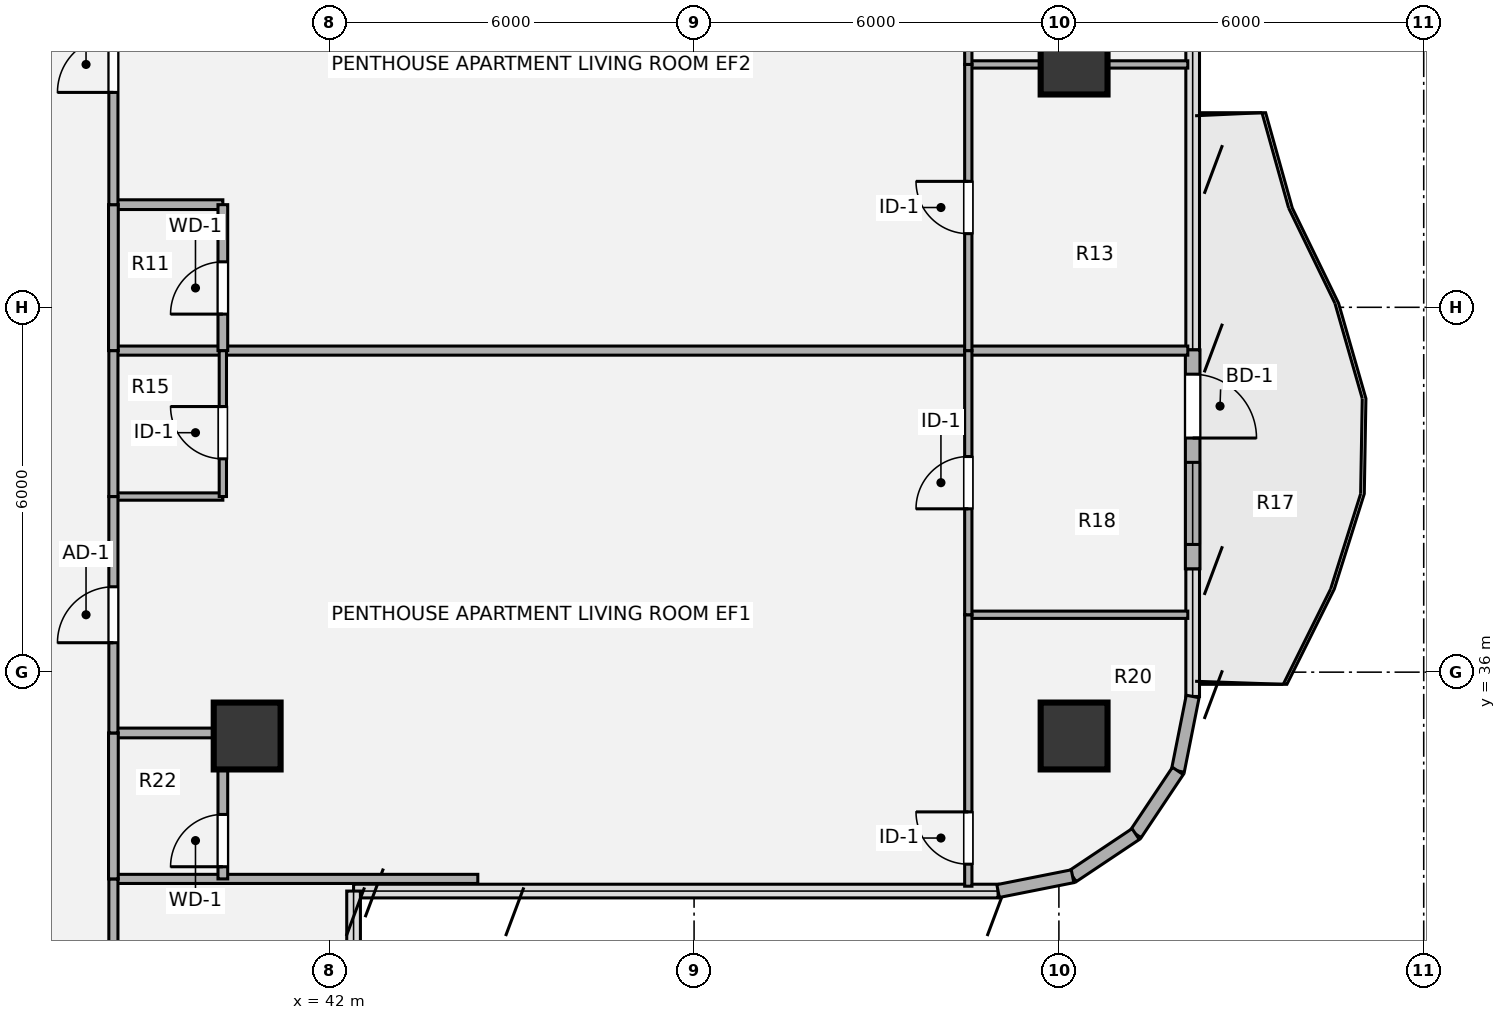
"""IFC4 building model, lengths in metres.
Left out: names, types, materials, properties, quantities, classifications, styles, units other than length and angle.
Written with IfcOpenShell. Run it as: python <this file> out.ifc"""

import sys

from ifc_helpers import new_model, si_unit, direction, frame, frame_2d, origin, origin_2d, place, context, subcontext, project, spatial, rectangle, hollow_circle, extrude, source, transform, mapped, element, fill, save


model = new_model("IFC4")
c1 = context("Model", 3, precision=1e-05, world=origin(), true_north=direction((0.0, 1.0)))
c2 = subcontext(c1, "Body", "Model", "MODEL_VIEW")
j1 = project(units=[si_unit("LENGTHUNIT", "METRE"), si_unit("PLANEANGLEUNIT", "RADIAN")], contexts=[c1])
p1 = place(None, origin())
s1 = spatial("IfcSite", under=j1, at=p1, CompositionType="ELEMENT")
p2 = place(p1, origin())
s2 = spatial("IfcBuilding", under=s1, at=p2, CompositionType="ELEMENT")
p3 = place(p2, frame((0.0, 0.0, 163.98)))
s3 = spatial("IfcBuildingStorey", under=s2, at=p3, CompositionType="ELEMENT", Elevation=163.98)
m1 = source(origin(), c2, "Body", "SweptSolid", [
    extrude(hollow_circle(Radius=0.55, WallThickness=0.04, at=origin_2d()), origin(), (0.0, 0.0, 1.0), 3.78),
])
for number, where, z_axis, x_axis in (
    (1, (54.25, 34.95, 0.0), (0.0, 0.0, 1.0), (1.0, 0.0, 0.0)),
    (2, (54.25, 46.05, 0.0), (0.0, 0.0, 1.0), (1.0, 0.0, 0.0)),
    (3, (40.65, 34.95, 0.0), (0.0, 0.0, 1.0), (1.0, 0.0, 0.0)),
):
    element("IfcColumn", number, at=place(p3, frame(where, z_axis=z_axis, x_axis=x_axis)), inside=s3, PredefinedType="COLUMN", context=c2, shape_type="MappedRepresentation", body=[
        mapped(m1, transform((0.0, 0.0, 0.0), x_axis=(1.0, 0.0, 0.0), y_axis=(0.0, 1.0, 0.0), z_axis=(0.0, 0.0, 1.0), scale=1.0)),
    ])
p4 = place(p3, frame((56.2, 41.3, 0.0), z_axis=(0.0, 0.0, 1.0), x_axis=(0.0, -1.0, 0.0)))
e4 = element("IfcWall", 4, at=p4, inside=s3, PredefinedType="SOLIDWALL", context=c2, shape_type="SweptSolid", body=[
    extrude(rectangle(XDim=3.6, YDim=0.24, at=frame_2d((1.8, 0.0))), origin(), (0.0, 0.0, 1.0), 3.53),
])
p5 = place(p4, frame((0.4, 0.0, 0.0)))
e5 = element("IfcOpeningElement", 5, at=p5, cuts=e4, PredefinedType="OPENING", context=c2, shape_type="SweptSolid", body=[
    extrude(rectangle(XDim=1.05, YDim=2.15, at=origin_2d()), frame((0.525, 0.13, 1.075), z_axis=(0.0, -1.0, 0.0), x_axis=(1.0, 0.0, 0.0)), (0.0, 0.0, 1.0), 0.26),
])
p6 = place(p4, frame((1.85, 0.0, 0.85)))
e6 = element("IfcOpeningElement", 6, at=p6, cuts=e4, PredefinedType="OPENING", context=c2, shape_type="SweptSolid", body=[
    extrude(rectangle(XDim=1.35, YDim=1.35, at=origin_2d()), frame((0.675, 0.13, 0.675), z_axis=(0.0, -1.0, 0.0), x_axis=(1.0, 0.0, 0.0)), (0.0, 0.0, 1.0), 0.26),
])
for number, where, z_axis, x_axis in (
    (7, (56.2, 35.6, 0.0), (0.0, 0.0, 1.0), (-0.195, -0.981, 0.0)),
    (8, (55.956, 34.375, 0.0), (0.0, 0.0, 1.0), (-0.556, -0.831, 0.0)),
    (9, (55.263, 33.337, 0.0), (0.0, 0.0, 1.0), (-0.831, -0.556, 0.0)),
    (10, (54.225, 32.644, 0.0), (0.0, 0.0, 1.0), (-0.981, -0.195, 0.0)),
):
    element("IfcWall", number, at=place(p3, frame(where, z_axis=z_axis, x_axis=x_axis)), inside=s3, PredefinedType="SOLIDWALL", context=c2, shape_type="SweptSolid", body=[
        extrude(rectangle(XDim=1.249, YDim=0.215, at=frame_2d((0.624, 0.0))), origin(), (0.0, 0.0, 1.0), 3.53),
    ])
p7 = place(p3, frame((38.45, 32.6, 0.0), z_axis=(0.0, 0.0, 1.0), x_axis=(1.0, 0.0, 0.0)))
e11 = element("IfcWall", 11, at=p7, inside=s3, PredefinedType="PARTITIONING", context=c2, shape_type="SweptSolid", body=[
    extrude(rectangle(XDim=5.993, YDim=0.15, at=frame_2d((2.997, 0.0))), origin(), (0.0, 0.0, 1.0), 3.5),
])
p8 = place(p3, frame((38.45, 35.0, 0.0), z_axis=(0.0, 0.0, 1.0), x_axis=(1.0, 0.0, 0.0)))
e12 = element("IfcWall", 12, at=p8, inside=s3, PredefinedType="PLUMBINGWALL", context=c2, shape_type="SweptSolid", body=[
    extrude(rectangle(XDim=1.8, YDim=0.16, at=frame_2d((0.9, 0.0))), origin(), (0.0, 0.0, 1.0), 2.903),
])
p9 = place(p3, frame((52.51, 36.944, 0.0), z_axis=(0.0, 0.0, 1.0), x_axis=(1.0, 0.0, 0.0)))
e13 = element("IfcWall", 13, at=p9, inside=s3, PredefinedType="PARTITIONING", context=c2, shape_type="SweptSolid", body=[
    extrude(rectangle(XDim=3.61, YDim=0.12, at=frame_2d((1.805, 0.0))), origin(), (0.0, 0.0, 1.0), 2.982),
])
p10 = place(p3, frame((38.45, 38.888, 0.0), z_axis=(0.0, 0.0, 1.0), x_axis=(1.0, 0.0, 0.0)))
e14 = element("IfcWall", 14, at=p10, inside=s3, PredefinedType="PARTITIONING", context=c2, shape_type="SweptSolid", body=[
    extrude(rectangle(XDim=1.8, YDim=0.12, at=frame_2d((0.9, 0.0))), origin(), (0.0, 0.0, 1.0), 3.259),
])
p11 = place(p3, frame((38.45, 41.288, 0.0), z_axis=(0.0, 0.0, 1.0), x_axis=(1.0, 0.0, 0.0)))
e15 = element("IfcWall", 15, at=p11, inside=s3, PredefinedType="PARTITIONING", context=c2, shape_type="SweptSolid", body=[
    extrude(rectangle(XDim=17.67, YDim=0.15, at=frame_2d((8.835, 0.0))), origin(), (0.0, 0.0, 1.0), 2.982),
])
p12 = place(p3, frame((38.45, 43.688, 0.0), z_axis=(0.0, 0.0, 1.0), x_axis=(1.0, 0.0, 0.0)))
e16 = element("IfcWall", 16, at=p12, inside=s3, PredefinedType="PLUMBINGWALL", context=c2, shape_type="SweptSolid", body=[
    extrude(rectangle(XDim=1.8, YDim=0.16, at=frame_2d((0.9, 0.0))), origin(), (0.0, 0.0, 1.0), 3.259),
])
p13 = place(p3, frame((52.51, 45.994, 0.0), z_axis=(0.0, 0.0, 1.0), x_axis=(1.0, 0.0, 0.0)))
e17 = element("IfcWall", 17, at=p13, inside=s3, PredefinedType="PARTITIONING", context=c2, shape_type="SweptSolid", body=[
    extrude(rectangle(XDim=3.61, YDim=0.12, at=frame_2d((1.805, 0.0))), origin(), (0.0, 0.0, 1.0), 2.903),
])
p14 = place(p3, frame((38.45, 22.4, 0.0), z_axis=(0.0, 0.0, 1.0), x_axis=(0.0, 1.0, 0.0)))
e18 = element("IfcWall", 18, at=p14, inside=s3, PredefinedType="PARTITIONING", context=c2, shape_type="SweptSolid", body=[
    extrude(rectangle(XDim=10.2, YDim=0.15, at=frame_2d((5.1, 0.0))), origin(), (0.0, 0.0, 1.0), 3.5),
])
p15 = place(p14, frame((4.475, 0.0, 0.0)))
e19 = element("IfcOpeningElement", 19, at=p15, cuts=e18, PredefinedType="OPENING", context=c2, shape_type="SweptSolid", body=[
    extrude(rectangle(XDim=1.05, YDim=2.1, at=origin_2d()), frame((0.525, 0.085, 1.05), z_axis=(0.0, -1.0, 0.0), x_axis=(1.0, 0.0, 0.0)), (0.0, 0.0, 1.0), 0.17),
])
p16 = place(p3, frame((38.45, 32.6, 0.0), z_axis=(0.0, 0.0, 1.0), x_axis=(0.0, 1.0, 0.0)))
e20 = element("IfcWall", 20, at=p16, inside=s3, PredefinedType="PLUMBINGWALL", context=c2, shape_type="SweptSolid", body=[
    extrude(rectangle(XDim=2.4, YDim=0.16, at=frame_2d((1.2, 0.0))), origin(), (0.0, 0.0, 1.0), 3.5),
])
p17 = place(p3, frame((38.45, 35.0, 0.0), z_axis=(0.0, 0.0, 1.0), x_axis=(0.0, 1.0, 0.0)))
e21 = element("IfcWall", 21, at=p17, inside=s3, PredefinedType="PARTITIONING", context=c2, shape_type="SweptSolid", body=[
    extrude(rectangle(XDim=3.888, YDim=0.15, at=frame_2d((1.944, 0.0))), origin(), (0.0, 0.0, 1.0), 3.5),
])
p18 = place(p17, frame((1.484, 0.0, 0.0)))
e22 = element("IfcOpeningElement", 22, at=p18, cuts=e21, PredefinedType="OPENING", context=c2, shape_type="SweptSolid", body=[
    extrude(rectangle(XDim=0.92, YDim=2.1, at=origin_2d()), frame((0.46, 0.085, 1.05), z_axis=(0.0, -1.0, 0.0), x_axis=(1.0, 0.0, 0.0)), (0.0, 0.0, 1.0), 0.17),
])
p19 = place(p3, frame((38.45, 38.888, 0.0), z_axis=(0.0, 0.0, 1.0), x_axis=(0.0, 1.0, 0.0)))
e23 = element("IfcWall", 23, at=p19, inside=s3, PredefinedType="PARTITIONING", context=c2, shape_type="SweptSolid", body=[
    extrude(rectangle(XDim=2.4, YDim=0.15, at=frame_2d((1.2, 0.0))), origin(), (0.0, 0.0, 1.0), 3.5),
])
p20 = place(p3, frame((38.45, 41.288, 0.0), z_axis=(0.0, 0.0, 1.0), x_axis=(0.0, 1.0, 0.0)))
e24 = element("IfcWall", 24, at=p20, inside=s3, PredefinedType="PLUMBINGWALL", context=c2, shape_type="SweptSolid", body=[
    extrude(rectangle(XDim=2.4, YDim=0.16, at=frame_2d((1.2, 0.0))), origin(), (0.0, 0.0, 1.0), 3.5),
])
p21 = place(p3, frame((38.45, 43.688, 0.0), z_axis=(0.0, 0.0, 1.0), x_axis=(0.0, 1.0, 0.0)))
e25 = element("IfcWall", 25, at=p21, inside=s3, PredefinedType="PARTITIONING", context=c2, shape_type="SweptSolid", body=[
    extrude(rectangle(XDim=4.612, YDim=0.15, at=frame_2d((2.306, 0.0))), origin(), (0.0, 0.0, 1.0), 3.5),
])
p22 = place(p21, frame((1.846, 0.0, 0.0)))
e26 = element("IfcOpeningElement", 26, at=p22, cuts=e25, PredefinedType="OPENING", context=c2, shape_type="SweptSolid", body=[
    extrude(rectangle(XDim=0.92, YDim=2.1, at=origin_2d()), frame((0.46, 0.085, 1.05), z_axis=(0.0, -1.0, 0.0), x_axis=(1.0, 0.0, 0.0)), (0.0, 0.0, 1.0), 0.17),
])
p23 = place(p3, frame((40.25, 32.6, 0.0), z_axis=(0.0, 0.0, 1.0), x_axis=(0.0, 1.0, 0.0)))
e27 = element("IfcWall", 27, at=p23, inside=s3, PredefinedType="PLUMBINGWALL", context=c2, shape_type="SweptSolid", body=[
    extrude(rectangle(XDim=2.4, YDim=0.16, at=frame_2d((1.2, 0.0))), origin(), (0.0, 0.0, 1.0), 3.5),
])
p24 = place(p23, frame((0.2, 0.0, 0.0)))
e28 = element("IfcOpeningElement", 28, at=p24, cuts=e27, PredefinedType="OPENING", context=c2, shape_type="SweptSolid", body=[
    extrude(rectangle(XDim=0.86, YDim=2.1, at=origin_2d()), frame((0.43, 0.09, 1.05), z_axis=(0.0, -1.0, 0.0), x_axis=(1.0, 0.0, 0.0)), (0.0, 0.0, 1.0), 0.18),
])
p25 = place(p3, frame((40.25, 38.888, 0.0), z_axis=(0.0, 0.0, 1.0), x_axis=(0.0, 1.0, 0.0)))
e29 = element("IfcWall", 29, at=p25, inside=s3, PredefinedType="PARTITIONING", context=c2, shape_type="SweptSolid", body=[
    extrude(rectangle(XDim=2.4, YDim=0.12, at=frame_2d((1.2, 0.0))), origin(), (0.0, 0.0, 1.0), 3.5),
])
p26 = place(p25, frame((0.62, 0.0, 0.0)))
e30 = element("IfcOpeningElement", 30, at=p26, cuts=e29, PredefinedType="OPENING", context=c2, shape_type="SweptSolid", body=[
    extrude(rectangle(XDim=0.86, YDim=2.1, at=origin_2d()), frame((0.43, 0.07, 1.05), z_axis=(0.0, -1.0, 0.0), x_axis=(1.0, 0.0, 0.0)), (0.0, 0.0, 1.0), 0.14),
])
p27 = place(p3, frame((40.25, 41.288, 0.0), z_axis=(0.0, 0.0, 1.0), x_axis=(0.0, 1.0, 0.0)))
e31 = element("IfcWall", 31, at=p27, inside=s3, PredefinedType="PLUMBINGWALL", context=c2, shape_type="SweptSolid", body=[
    extrude(rectangle(XDim=2.4, YDim=0.16, at=frame_2d((1.2, 0.0))), origin(), (0.0, 0.0, 1.0), 3.5),
])
p28 = place(p27, frame((0.6, 0.0, 0.0)))
e32 = element("IfcOpeningElement", 32, at=p28, cuts=e31, PredefinedType="OPENING", context=c2, shape_type="SweptSolid", body=[
    extrude(rectangle(XDim=0.86, YDim=2.1, at=origin_2d()), frame((0.43, 0.09, 1.05), z_axis=(0.0, -1.0, 0.0), x_axis=(1.0, 0.0, 0.0)), (0.0, 0.0, 1.0), 0.18),
])
p29 = place(p3, frame((52.51, 32.48, 0.0), z_axis=(0.0, 0.0, 1.0), x_axis=(0.0, 1.0, 0.0)))
e33 = element("IfcWall", 33, at=p29, inside=s3, PredefinedType="PARTITIONING", context=c2, shape_type="SweptSolid", body=[
    extrude(rectangle(XDim=4.464, YDim=0.12, at=frame_2d((2.232, 0.0))), origin(), (0.0, 0.0, 1.0), 3.5),
])
p30 = place(p29, frame((0.362, 0.0, 0.0)))
e34 = element("IfcOpeningElement", 34, at=p30, cuts=e33, PredefinedType="OPENING", context=c2, shape_type="SweptSolid", body=[
    extrude(rectangle(XDim=0.86, YDim=2.1, at=origin_2d()), frame((0.43, 0.07, 1.05), z_axis=(0.0, -1.0, 0.0), x_axis=(1.0, 0.0, 0.0)), (0.0, 0.0, 1.0), 0.14),
])
p31 = place(p3, frame((52.51, 36.944, 0.0), z_axis=(0.0, 0.0, 1.0), x_axis=(0.0, 1.0, 0.0)))
e35 = element("IfcWall", 35, at=p31, inside=s3, PredefinedType="PARTITIONING", context=c2, shape_type="SweptSolid", body=[
    extrude(rectangle(XDim=4.344, YDim=0.12, at=frame_2d((2.172, 0.0))), origin(), (0.0, 0.0, 1.0), 3.5),
])
p32 = place(p31, frame((1.742, 0.0, 0.0)))
e36 = element("IfcOpeningElement", 36, at=p32, cuts=e35, PredefinedType="OPENING", context=c2, shape_type="SweptSolid", body=[
    extrude(rectangle(XDim=0.86, YDim=2.1, at=origin_2d()), frame((0.43, 0.07, 1.05), z_axis=(0.0, -1.0, 0.0), x_axis=(1.0, 0.0, 0.0)), (0.0, 0.0, 1.0), 0.14),
])
p33 = place(p3, frame((52.51, 41.288, 0.0), z_axis=(0.0, 0.0, 1.0), x_axis=(0.0, 1.0, 0.0)))
e37 = element("IfcWall", 37, at=p33, inside=s3, PredefinedType="PARTITIONING", context=c2, shape_type="SweptSolid", body=[
    extrude(rectangle(XDim=4.706, YDim=0.12, at=frame_2d((2.353, 0.0))), origin(), (0.0, 0.0, 1.0), 3.5),
])
p34 = place(p33, frame((1.923, 0.0, 0.0)))
e38 = element("IfcOpeningElement", 38, at=p34, cuts=e37, PredefinedType="OPENING", context=c2, shape_type="SweptSolid", body=[
    extrude(rectangle(XDim=0.86, YDim=2.1, at=origin_2d()), frame((0.43, 0.07, 1.05), z_axis=(0.0, -1.0, 0.0), x_axis=(1.0, 0.0, 0.0)), (0.0, 0.0, 1.0), 0.14),
])
p35 = place(p3, frame((52.51, 45.994, 0.0), z_axis=(0.0, 0.0, 1.0), x_axis=(0.0, 1.0, 0.0)))
e39 = element("IfcWall", 39, at=p35, inside=s3, PredefinedType="PARTITIONING", context=c2, shape_type="SweptSolid", body=[
    extrude(rectangle(XDim=4.706, YDim=0.12, at=frame_2d((2.353, 0.0))), origin(), (0.0, 0.0, 1.0), 3.5),
])
p36 = place(p35, frame((1.923, 0.0, 0.0)))
e40 = element("IfcOpeningElement", 40, at=p36, cuts=e39, PredefinedType="OPENING", context=c2, shape_type="SweptSolid", body=[
    extrude(rectangle(XDim=0.86, YDim=2.1, at=origin_2d()), frame((0.43, 0.07, 1.05), z_axis=(0.0, -1.0, 0.0), x_axis=(1.0, 0.0, 0.0)), (0.0, 0.0, 1.0), 0.14),
])
m2 = source(origin(), c2, "Body", "SweptSolid", [
    extrude(rectangle(XDim=1.05, YDim=2.15, at=origin_2d()), frame((0.525, 0.025, 1.075), z_axis=(0.0, -1.0, 0.0), x_axis=(1.0, 0.0, 0.0)), (0.0, 0.0, 1.0), 0.05),
])
p37 = place(p5, origin())
e41 = element("IfcDoor", 41, at=p37, inside=s3, OperationType="SINGLE_SWING_RIGHT", PredefinedType="DOOR", context=c2, shape_type="MappedRepresentation", body=[
    mapped(m2, transform((0.0, 0.0, 0.0), x_axis=(1.0, 0.0, 0.0), y_axis=(0.0, 1.0, 0.0), z_axis=(0.0, 0.0, 1.0), scale=1.0)),
])
fill(e5, e41)
m3 = source(origin(), c2, "Body", "SweptSolid", [
    extrude(rectangle(XDim=1.35, YDim=1.35, at=origin_2d()), frame((0.675, 0.03, 0.675), z_axis=(0.0, -1.0, 0.0), x_axis=(1.0, 0.0, 0.0)), (0.0, 0.0, 1.0), 0.06),
])
p38 = place(p6, origin())
e42 = element("IfcWindow", 42, at=p38, inside=s3, PartitioningType="SINGLE_PANEL", PredefinedType="WINDOW", context=c2, shape_type="MappedRepresentation", body=[
    mapped(m3, transform((0.0, 0.0, 0.0), x_axis=(1.0, 0.0, 0.0), y_axis=(0.0, 1.0, 0.0), z_axis=(0.0, 0.0, 1.0), scale=1.0)),
])
fill(e6, e42)
m4 = source(origin(), c2, "Body", "SweptSolid", [
    extrude(rectangle(XDim=0.92, YDim=2.1, at=origin_2d()), frame((0.46, 0.025, 1.05), z_axis=(0.0, -1.0, 0.0), x_axis=(1.0, 0.0, 0.0)), (0.0, 0.0, 1.0), 0.05),
])
p39 = place(p18, origin())
e43 = element("IfcDoor", 43, at=p39, inside=s3, OperationType="SINGLE_SWING_LEFT", PredefinedType="DOOR", context=c2, shape_type="MappedRepresentation", body=[
    mapped(m4, transform((0.0, 0.0, 0.0), x_axis=(1.0, 0.0, 0.0), y_axis=(0.0, 1.0, 0.0), z_axis=(0.0, 0.0, 1.0), scale=1.0)),
])
fill(e22, e43)
p40 = place(p22, origin())
e44 = element("IfcDoor", 44, at=p40, inside=s3, OperationType="SINGLE_SWING_LEFT", PredefinedType="DOOR", context=c2, shape_type="MappedRepresentation", body=[
    mapped(m4, transform((0.0, 0.0, 0.0), x_axis=(1.0, 0.0, 0.0), y_axis=(0.0, 1.0, 0.0), z_axis=(0.0, 0.0, 1.0), scale=1.0)),
])
fill(e26, e44)
m5 = source(origin(), c2, "Body", "SweptSolid", [
    extrude(rectangle(XDim=0.86, YDim=2.1, at=origin_2d()), frame((0.43, 0.025, 1.05), z_axis=(0.0, -1.0, 0.0), x_axis=(1.0, 0.0, 0.0)), (0.0, 0.0, 1.0), 0.05),
])
p41 = place(p24, origin())
e45 = element("IfcDoor", 45, at=p41, inside=s3, OperationType="SINGLE_SWING_LEFT", PredefinedType="DOOR", context=c2, shape_type="MappedRepresentation", body=[
    mapped(m5, transform((0.0, 0.0, 0.0), x_axis=(1.0, 0.0, 0.0), y_axis=(0.0, 1.0, 0.0), z_axis=(0.0, 0.0, 1.0), scale=1.0)),
])
fill(e28, e45)
m6 = source(origin(), c2, "Body", "SweptSolid", [
    extrude(rectangle(XDim=0.86, YDim=2.1, at=origin_2d()), frame((0.43, 0.025, 1.05), z_axis=(0.0, -1.0, 0.0), x_axis=(1.0, 0.0, 0.0)), (0.0, 0.0, 1.0), 0.05),
])
p42 = place(p26, origin())
e46 = element("IfcDoor", 46, at=p42, inside=s3, OperationType="SINGLE_SWING_RIGHT", PredefinedType="DOOR", context=c2, shape_type="MappedRepresentation", body=[
    mapped(m6, transform((0.0, 0.0, 0.0), x_axis=(1.0, 0.0, 0.0), y_axis=(0.0, 1.0, 0.0), z_axis=(0.0, 0.0, 1.0), scale=1.0)),
])
fill(e30, e46)
p43 = place(p28, origin())
e47 = element("IfcDoor", 47, at=p43, inside=s3, OperationType="SINGLE_SWING_LEFT", PredefinedType="DOOR", context=c2, shape_type="MappedRepresentation", body=[
    mapped(m5, transform((0.0, 0.0, 0.0), x_axis=(1.0, 0.0, 0.0), y_axis=(0.0, 1.0, 0.0), z_axis=(0.0, 0.0, 1.0), scale=1.0)),
])
fill(e32, e47)
p44 = place(p30, origin())
e48 = element("IfcDoor", 48, at=p44, inside=s3, OperationType="SINGLE_SWING_RIGHT", PredefinedType="DOOR", context=c2, shape_type="MappedRepresentation", body=[
    mapped(m6, transform((0.0, 0.0, 0.0), x_axis=(1.0, 0.0, 0.0), y_axis=(0.0, 1.0, 0.0), z_axis=(0.0, 0.0, 1.0), scale=1.0)),
])
fill(e34, e48)
p45 = place(p32, origin())
e49 = element("IfcDoor", 49, at=p45, inside=s3, OperationType="SINGLE_SWING_LEFT", PredefinedType="DOOR", context=c2, shape_type="MappedRepresentation", body=[
    mapped(m6, transform((0.0, 0.0, 0.0), x_axis=(1.0, 0.0, 0.0), y_axis=(0.0, 1.0, 0.0), z_axis=(0.0, 0.0, 1.0), scale=1.0)),
])
fill(e36, e49)
p46 = place(p34, origin())
e50 = element("IfcDoor", 50, at=p46, inside=s3, OperationType="SINGLE_SWING_RIGHT", PredefinedType="DOOR", context=c2, shape_type="MappedRepresentation", body=[
    mapped(m6, transform((0.0, 0.0, 0.0), x_axis=(1.0, 0.0, 0.0), y_axis=(0.0, 1.0, 0.0), z_axis=(0.0, 0.0, 1.0), scale=1.0)),
])
fill(e38, e50)
save(model, sys.argv[1])
